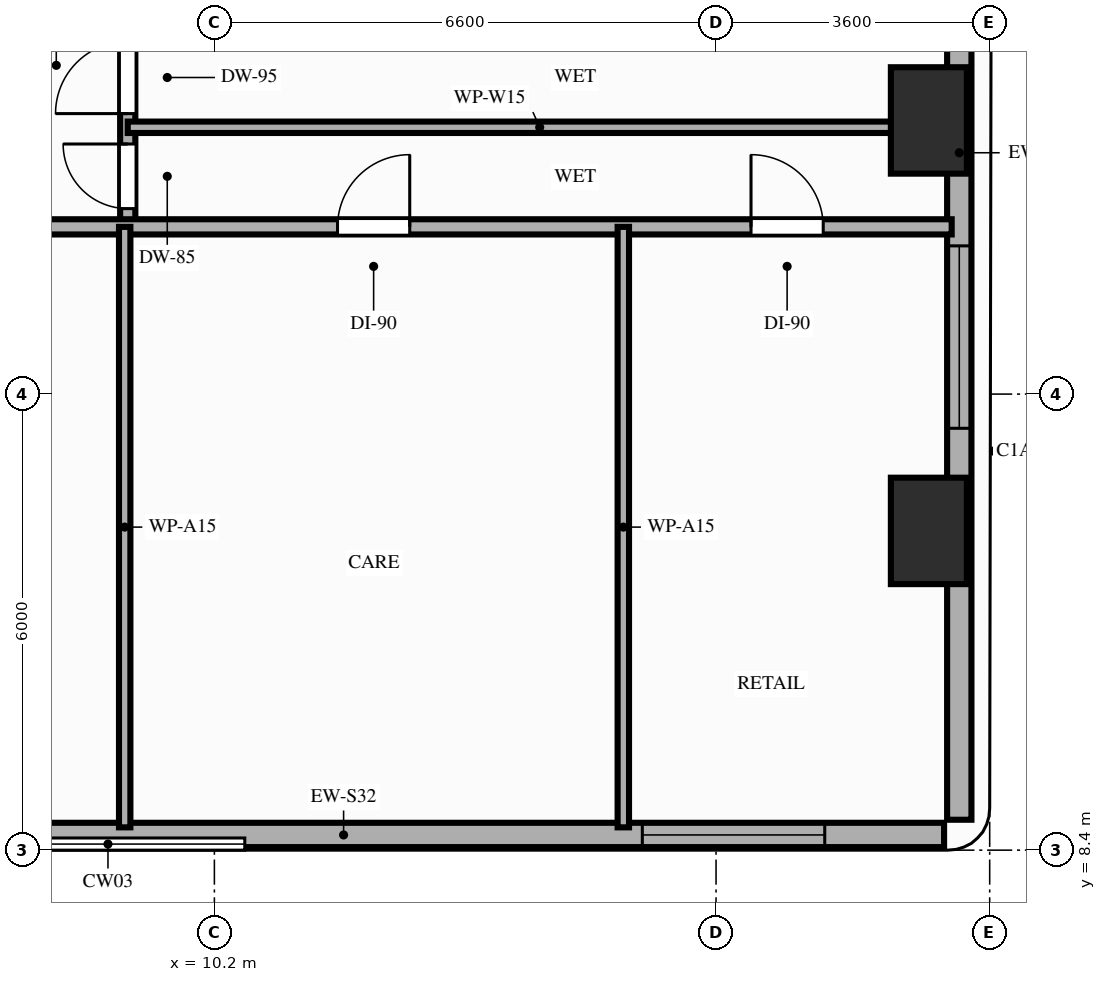
"""IFC4 building model, lengths in metres.
Left out: names, types, materials, properties, quantities, classifications, styles, units other than length and angle.
Written with IfcOpenShell. Run it as: python <this file> out.ifc"""

import sys

from ifc_helpers import new_model, si_unit, direction, frame, frame_2d, origin, origin_2d, place, context, subcontext, project, spatial, rectangle, extrude, element, fill, save


model = new_model("IFC4")
c1 = context("Model", 3, precision=1e-05, world=origin(), true_north=direction((0.0, 1.0)))
c2 = subcontext(c1, "Body", "Model", "MODEL_VIEW")
j1 = project(units=[si_unit("LENGTHUNIT", "METRE"), si_unit("PLANEANGLEUNIT", "RADIAN")], contexts=[c1])
p1 = place(None, origin())
s1 = spatial("IfcSite", under=j1, at=p1, CompositionType="ELEMENT")
p2 = place(p1, origin())
s2 = spatial("IfcBuilding", under=s1, at=p2, CompositionType="ELEMENT")
p3 = place(p2, frame((0.0, 0.0, 59.6)))
s3 = spatial("IfcBuildingStorey", under=s2, at=p3, CompositionType="ELEMENT", Elevation=59.6)
for number, where, z_axis, x_axis in (
    (1, (19.6, 12.6, 0.0), (0.0, 0.0, 1.0), (1.0, 0.0, 0.0)),
    (2, (19.6, 18.0, 0.0), (0.0, 0.0, 1.0), (1.0, 0.0, 0.0)),
):
    element("IfcColumn", number, at=place(p3, frame(where, z_axis=z_axis, x_axis=x_axis)), inside=s3, PredefinedType="COLUMN", context=c2, shape_type="SweptSolid", body=[
        extrude(rectangle(XDim=1.0, YDim=1.4, at=origin_2d()), origin(), (0.0, 0.0, 1.0), 3.2),
    ])
p4 = place(p3, frame((4.0, 8.6, 0.0), z_axis=(0.0, 0.0, 1.0), x_axis=(1.0, 0.0, 0.0)))
e3 = element("IfcWall", 3, at=p4, inside=s3, PredefinedType="STANDARD", context=c2, shape_type="SweptSolid", body=[
    extrude(rectangle(XDim=15.8, YDim=0.32, at=frame_2d((7.9, 0.0))), origin(), (0.0, 0.0, 1.0), 3.02),
])
p5 = place(p4, frame((11.83, 0.0, 0.85)))
e4 = element("IfcOpeningElement", 4, at=p5, cuts=e3, PredefinedType="OPENING", context=c2, shape_type="SweptSolid", body=[
    extrude(rectangle(XDim=2.4, YDim=1.8, at=frame_2d((1.2, 0.9))), frame((0.0, 0.17, 0.0), z_axis=(0.0, -1.0, 0.0), x_axis=(1.0, 0.0, 0.0)), (0.0, 0.0, 1.0), 0.34),
])
p6 = place(p3, frame((20.0, 8.8, 0.0), z_axis=(0.0, 0.0, 1.0), x_axis=(0.0, 1.0, 0.0)))
e5 = element("IfcWall", 5, at=p6, inside=s3, PredefinedType="STANDARD", context=c2, shape_type="SweptSolid", body=[
    extrude(rectangle(XDim=17.55, YDim=0.32, at=frame_2d((8.775, 0.0))), origin(), (0.0, 0.0, 1.0), 2.41),
])
p7 = place(p6, frame((5.15, 0.0, 0.85)))
e6 = element("IfcOpeningElement", 6, at=p7, cuts=e5, PredefinedType="OPENING", context=c2, shape_type="SweptSolid", body=[
    extrude(rectangle(XDim=2.4, YDim=1.31, at=frame_2d((1.2, 0.655))), frame((0.0, 0.17, 0.0), z_axis=(0.0, -1.0, 0.0), x_axis=(1.0, 0.0, 0.0)), (0.0, 0.0, 1.0), 0.34),
])
p8 = place(p6, frame((10.7, 0.0, 0.85)))
e7 = element("IfcOpeningElement", 7, at=p8, cuts=e5, PredefinedType="OPENING", context=c2, shape_type="SweptSolid", body=[
    extrude(rectangle(XDim=2.4, YDim=1.31, at=frame_2d((1.2, 0.655))), frame((0.0, 0.17, 0.0), z_axis=(0.0, -1.0, 0.0), x_axis=(1.0, 0.0, 0.0)), (0.0, 0.0, 1.0), 0.34),
])
p9 = place(p3, frame((9.06, 16.6, 0.0), z_axis=(0.0, 0.0, 1.0), x_axis=(0.0, 1.0, 0.0)))
e8 = element("IfcWall", 8, at=p9, inside=s3, PredefinedType="PARTITIONING", context=c2, shape_type="SweptSolid", body=[
    extrude(rectangle(XDim=11.5, YDim=0.2, at=frame_2d((5.75, 0.0))), origin(), (0.0, 0.0, 1.0), 2.41),
])
p10 = place(p9, frame((0.24, 0.0, 0.0)))
e9 = element("IfcOpeningElement", 9, at=p10, cuts=e8, PredefinedType="OPENING", context=c2, shape_type="SweptSolid", body=[
    extrude(rectangle(XDim=0.85, YDim=2.1, at=frame_2d((0.425, 1.05))), frame((0.0, 0.11, 0.0), z_axis=(0.0, -1.0, 0.0), x_axis=(1.0, 0.0, 0.0)), (0.0, 0.0, 1.0), 0.22),
])
p11 = place(p9, frame((1.49, 0.0, 0.0)))
e10 = element("IfcOpeningElement", 10, at=p11, cuts=e8, PredefinedType="OPENING", context=c2, shape_type="SweptSolid", body=[
    extrude(rectangle(XDim=0.95, YDim=2.1, at=frame_2d((0.475, 1.05))), frame((0.0, 0.11, 0.0), z_axis=(0.0, -1.0, 0.0), x_axis=(1.0, 0.0, 0.0)), (0.0, 0.0, 1.0), 0.22),
])
p12 = place(p9, frame((6.56, 0.0, 0.0)))
e11 = element("IfcOpeningElement", 11, at=p12, cuts=e8, PredefinedType="OPENING", context=c2, shape_type="SweptSolid", body=[
    extrude(rectangle(XDim=1.0, YDim=2.15, at=frame_2d((0.5, 1.075))), frame((0.0, 0.11, 0.0), z_axis=(0.0, -1.0, 0.0), x_axis=(1.0, 0.0, 0.0)), (0.0, 0.0, 1.0), 0.22),
])
p13 = place(p3, frame((3.9, 16.6, 0.0), z_axis=(0.0, 0.0, 1.0), x_axis=(1.0, 0.0, 0.0)))
e12 = element("IfcWall", 12, at=p13, inside=s3, PredefinedType="PARTITIONING", context=c2, shape_type="SweptSolid", body=[
    extrude(rectangle(XDim=16.0, YDim=0.2, at=frame_2d((8.0, 0.0))), origin(), (0.0, 0.0, 1.0), 2.41),
])
p14 = place(p13, frame((2.48, 0.0, 0.0)))
e13 = element("IfcOpeningElement", 13, at=p14, cuts=e12, PredefinedType="OPENING", context=c2, shape_type="SweptSolid", body=[
    extrude(rectangle(XDim=0.95, YDim=2.15, at=frame_2d((0.475, 1.075))), frame((0.0, 0.11, 0.0), z_axis=(0.0, -1.0, 0.0), x_axis=(1.0, 0.0, 0.0)), (0.0, 0.0, 1.0), 0.22),
])
p15 = place(p13, frame((7.92, 0.0, 0.0)))
e14 = element("IfcOpeningElement", 14, at=p15, cuts=e12, PredefinedType="OPENING", context=c2, shape_type="SweptSolid", body=[
    extrude(rectangle(XDim=0.95, YDim=2.15, at=frame_2d((0.475, 1.075))), frame((0.0, 0.11, 0.0), z_axis=(0.0, -1.0, 0.0), x_axis=(1.0, 0.0, 0.0)), (0.0, 0.0, 1.0), 0.22),
])
p16 = place(p13, frame((13.36, 0.0, 0.0)))
e15 = element("IfcOpeningElement", 15, at=p16, cuts=e12, PredefinedType="OPENING", context=c2, shape_type="SweptSolid", body=[
    extrude(rectangle(XDim=0.95, YDim=2.15, at=frame_2d((0.475, 1.075))), frame((0.0, 0.11, 0.0), z_axis=(0.0, -1.0, 0.0), x_axis=(1.0, 0.0, 0.0)), (0.0, 0.0, 1.0), 0.22),
])
for number, where, z_axis, x_axis in (
    (16, (9.02, 8.7, 0.0), (0.0, 0.0, 1.0), (0.0, 1.0, 0.0)),
    (17, (15.58, 8.7, 0.0), (0.0, 0.0, 1.0), (0.0, 1.0, 0.0)),
):
    element("IfcWall", number, at=place(p3, frame(where, z_axis=z_axis, x_axis=x_axis)), inside=s3, PredefinedType="PARTITIONING", context=c2, shape_type="SweptSolid", body=[
        extrude(rectangle(XDim=7.9, YDim=0.15, at=frame_2d((3.95, 0.0))), origin(), (0.0, 0.0, 1.0), 2.41),
    ])
p17 = place(p3, frame((9.06, 17.91, 0.0), z_axis=(0.0, 0.0, 1.0), x_axis=(1.0, 0.0, 0.0)))
e18 = element("IfcWall", 18, at=p17, inside=s3, PredefinedType="PARTITIONING", context=c2, shape_type="SweptSolid", body=[
    extrude(rectangle(XDim=10.84, YDim=0.15, at=frame_2d((5.42, 0.0))), origin(), (0.0, 0.0, 1.0), 2.41),
])
p18 = place(p7, origin())
e19 = element("IfcWindow", 19, at=p18, inside=s3, PartitioningType="SINGLE_PANEL", PredefinedType="WINDOW", context=c2, shape_type="SweptSolid", body=[
    extrude(rectangle(XDim=2.4, YDim=1.31, at=frame_2d((1.2, 0.655))), frame((0.0, 0.03, 0.0), z_axis=(0.0, -1.0, 0.0), x_axis=(1.0, 0.0, 0.0)), (0.0, 0.0, 1.0), 0.06),
])
fill(e6, e19)
p19 = place(p5, origin())
e20 = element("IfcWindow", 20, at=p19, inside=s3, PartitioningType="SINGLE_PANEL", PredefinedType="WINDOW", context=c2, shape_type="SweptSolid", body=[
    extrude(rectangle(XDim=2.4, YDim=1.8, at=frame_2d((1.2, 0.9))), frame((0.0, 0.03, 0.0), z_axis=(0.0, -1.0, 0.0), x_axis=(1.0, 0.0, 0.0)), (0.0, 0.0, 1.0), 0.06),
])
fill(e4, e20)
p20 = place(p15, origin())
e21 = element("IfcDoor", 21, at=p20, inside=s3, OperationType="SINGLE_SWING_RIGHT", PredefinedType="DOOR", context=c2, shape_type="SweptSolid", body=[
    extrude(rectangle(XDim=0.95, YDim=2.15, at=frame_2d((0.475, 1.075))), frame((0.0, 0.025, 0.0), z_axis=(0.0, -1.0, 0.0), x_axis=(1.0, 0.0, 0.0)), (0.0, 0.0, 1.0), 0.05),
])
fill(e14, e21)
p21 = place(p16, origin())
e22 = element("IfcDoor", 22, at=p21, inside=s3, OperationType="SINGLE_SWING_LEFT", PredefinedType="DOOR", context=c2, shape_type="SweptSolid", body=[
    extrude(rectangle(XDim=0.95, YDim=2.15, at=frame_2d((0.475, 1.075))), frame((0.0, 0.025, 0.0), z_axis=(0.0, -1.0, 0.0), x_axis=(1.0, 0.0, 0.0)), (0.0, 0.0, 1.0), 0.05),
])
fill(e15, e22)
p22 = place(p10, origin())
e23 = element("IfcDoor", 23, at=p22, inside=s3, OperationType="SINGLE_SWING_RIGHT", PredefinedType="DOOR", context=c2, shape_type="SweptSolid", body=[
    extrude(rectangle(XDim=0.85, YDim=2.1, at=frame_2d((0.425, 1.05))), frame((0.0, 0.025, 0.0), z_axis=(0.0, -1.0, 0.0), x_axis=(1.0, 0.0, 0.0)), (0.0, 0.0, 1.0), 0.05),
])
fill(e9, e23)
p23 = place(p11, origin())
e24 = element("IfcDoor", 24, at=p23, inside=s3, OperationType="SINGLE_SWING_LEFT", PredefinedType="DOOR", context=c2, shape_type="SweptSolid", body=[
    extrude(rectangle(XDim=0.95, YDim=2.1, at=frame_2d((0.475, 1.05))), frame((0.0, 0.025, 0.0), z_axis=(0.0, -1.0, 0.0), x_axis=(1.0, 0.0, 0.0)), (0.0, 0.0, 1.0), 0.05),
])
fill(e10, e24)
save(model, sys.argv[1])
